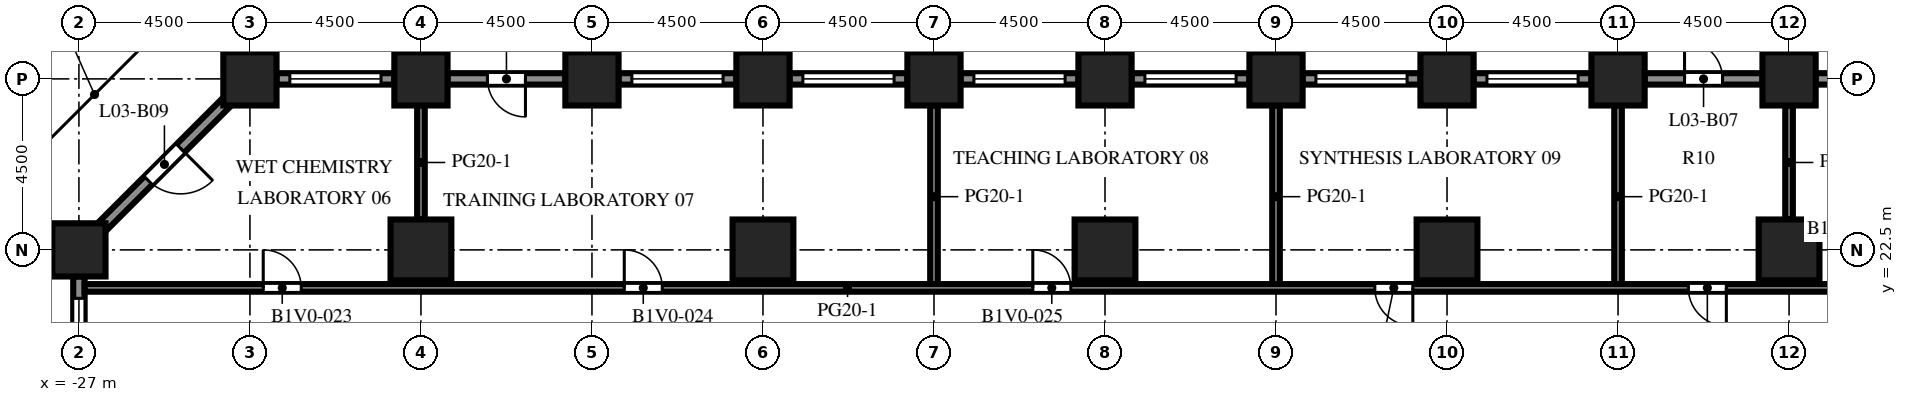
"""IFC4 building model, lengths in metres.
Left out: names, types, materials, properties, quantities, classifications, styles, units other than length and angle.
Written with IfcOpenShell. Run it as: python <this file> out.ifc"""

import sys

from ifc_helpers import new_model, si_unit, direction, frame, frame_2d, origin, origin_2d, place, context, subcontext, project, spatial, rectangle, extrude, element, fill, save


model = new_model("IFC4")
c1 = context("Model", 3, precision=1e-05, world=origin(), true_north=direction((0.0, 1.0)))
c2 = subcontext(c1, "Body", "Model", "MODEL_VIEW")
j1 = project(units=[si_unit("LENGTHUNIT", "METRE"), si_unit("PLANEANGLEUNIT", "RADIAN")], contexts=[c1])
p1 = place(None, origin())
s1 = spatial("IfcSite", under=j1, at=p1, CompositionType="ELEMENT")
p2 = place(p1, origin())
s2 = spatial("IfcBuilding", under=s1, at=p2, CompositionType="ELEMENT")
p3 = place(p2, frame((0.0, 0.0, 15.4)))
s3 = spatial("IfcBuildingStorey", under=s2, at=p3, CompositionType="ELEMENT", Elevation=15.4)
for number, where, z_axis, x_axis in (
    (1, (-27.0, 22.5, 0.0), (0.0, 0.0, 1.0), (1.0, 0.0, 0.0)),
    (2, (-22.5, 27.0, 0.0), (0.0, 0.0, 1.0), (1.0, 0.0, 0.0)),
    (3, (-18.0, 27.0, 0.0), (0.0, 0.0, 1.0), (1.0, 0.0, 0.0)),
    (4, (-13.5, 27.0, 0.0), (0.0, 0.0, 1.0), (1.0, 0.0, 0.0)),
    (5, (-9.0, 27.0, 0.0), (0.0, 0.0, 1.0), (1.0, 0.0, 0.0)),
    (6, (-4.5, 27.0, 0.0), (0.0, 0.0, 1.0), (1.0, 0.0, 0.0)),
    (7, (0.0, 27.0, 0.0), (0.0, 0.0, 1.0), (1.0, 0.0, 0.0)),
    (8, (4.5, 27.0, 0.0), (0.0, 0.0, 1.0), (1.0, 0.0, 0.0)),
    (9, (9.0, 27.0, 0.0), (0.0, 0.0, 1.0), (1.0, 0.0, 0.0)),
    (10, (13.5, 27.0, 0.0), (0.0, 0.0, 1.0), (1.0, 0.0, 0.0)),
    (11, (18.0, 27.0, 0.0), (0.0, 0.0, 1.0), (1.0, 0.0, 0.0)),
):
    element("IfcColumn", number, at=place(p3, frame(where, z_axis=z_axis, x_axis=x_axis)), inside=s3, PredefinedType="COLUMN", context=c2, shape_type="SweptSolid", body=[
        extrude(rectangle(XDim=1.4, YDim=1.4, at=origin_2d()), origin(), (0.0, 0.0, 1.0), 4.1),
    ])
for number, where, z_axis, x_axis in (
    (12, (-18.0, 22.5, 0.0), (0.0, 0.0, 1.0), (1.0, 0.0, 0.0)),
    (13, (-9.0, 22.5, 0.0), (0.0, 0.0, 1.0), (1.0, 0.0, 0.0)),
    (14, (0.0, 22.5, 0.0), (0.0, 0.0, 1.0), (1.0, 0.0, 0.0)),
    (15, (9.0, 22.5, 0.0), (0.0, 0.0, 1.0), (1.0, 0.0, 0.0)),
    (16, (18.0, 22.5, 0.0), (0.0, 0.0, 1.0), (1.0, 0.0, 0.0)),
):
    element("IfcColumn", number, at=place(p3, frame(where, z_axis=z_axis, x_axis=x_axis)), inside=s3, PredefinedType="COLUMN", context=c2, shape_type="SweptSolid", body=[
        extrude(rectangle(XDim=1.6, YDim=1.6, at=origin_2d()), origin(), (0.0, 0.0, 1.0), 4.1),
    ])
p4 = place(p3, frame((18.7, 27.0, 0.0), z_axis=(0.0, 0.0, 1.0), x_axis=(1.0, 0.0, 0.0)))
e17 = element("IfcWall", 17, at=p4, inside=s3, PredefinedType="SOLIDWALL", context=c2, shape_type="SweptSolid", body=[
    extrude(rectangle(XDim=3.1, YDim=0.3, at=frame_2d((1.55, 0.0))), origin(), (0.0, 0.0, 1.0), 2.75),
])
p5 = place(p4, frame((0.35, 0.0, 0.8)))
e18 = element("IfcOpeningElement", 18, at=p5, cuts=e17, PredefinedType="OPENING", context=c2, shape_type="SweptSolid", body=[
    extrude(rectangle(XDim=2.4, YDim=1.7, at=frame_2d((1.2, 0.85))), frame((0.0, 0.16, 0.0), z_axis=(0.0, -1.0, 0.0), x_axis=(1.0, 0.0, 0.0)), (0.0, 0.0, 1.0), 0.32),
])
p6 = place(p3, frame((14.2, 27.0, 0.0), z_axis=(0.0, 0.0, 1.0), x_axis=(1.0, 0.0, 0.0)))
e19 = element("IfcWall", 19, at=p6, inside=s3, PredefinedType="SOLIDWALL", context=c2, shape_type="SweptSolid", body=[
    extrude(rectangle(XDim=3.1, YDim=0.3, at=frame_2d((1.55, 0.0))), origin(), (0.0, 0.0, 1.0), 2.75),
])
p7 = place(p6, frame((1.05, 0.0, 0.0)))
e20 = element("IfcOpeningElement", 20, at=p7, cuts=e19, PredefinedType="OPENING", context=c2, shape_type="SweptSolid", body=[
    extrude(rectangle(XDim=1.0, YDim=2.2, at=frame_2d((0.5, 1.1))), frame((0.0, 0.16, 0.0), z_axis=(0.0, -1.0, 0.0), x_axis=(1.0, 0.0, 0.0)), (0.0, 0.0, 1.0), 0.32),
])
p8 = place(p3, frame((9.7, 27.0, 0.0), z_axis=(0.0, 0.0, 1.0), x_axis=(1.0, 0.0, 0.0)))
e21 = element("IfcWall", 21, at=p8, inside=s3, PredefinedType="SOLIDWALL", context=c2, shape_type="SweptSolid", body=[
    extrude(rectangle(XDim=3.1, YDim=0.3, at=frame_2d((1.55, 0.0))), origin(), (0.0, 0.0, 1.0), 2.75),
])
p9 = place(p8, frame((0.35, 0.0, 0.8)))
e22 = element("IfcOpeningElement", 22, at=p9, cuts=e21, PredefinedType="OPENING", context=c2, shape_type="SweptSolid", body=[
    extrude(rectangle(XDim=2.4, YDim=1.7, at=frame_2d((1.2, 0.85))), frame((0.0, 0.16, 0.0), z_axis=(0.0, -1.0, 0.0), x_axis=(1.0, 0.0, 0.0)), (0.0, 0.0, 1.0), 0.32),
])
p10 = place(p3, frame((5.2, 27.0, 0.0), z_axis=(0.0, 0.0, 1.0), x_axis=(1.0, 0.0, 0.0)))
e23 = element("IfcWall", 23, at=p10, inside=s3, PredefinedType="SOLIDWALL", context=c2, shape_type="SweptSolid", body=[
    extrude(rectangle(XDim=3.1, YDim=0.3, at=frame_2d((1.55, 0.0))), origin(), (0.0, 0.0, 1.0), 2.75),
])
p11 = place(p10, frame((0.35, 0.0, 0.8)))
e24 = element("IfcOpeningElement", 24, at=p11, cuts=e23, PredefinedType="OPENING", context=c2, shape_type="SweptSolid", body=[
    extrude(rectangle(XDim=2.4, YDim=1.7, at=frame_2d((1.2, 0.85))), frame((0.0, 0.16, 0.0), z_axis=(0.0, -1.0, 0.0), x_axis=(1.0, 0.0, 0.0)), (0.0, 0.0, 1.0), 0.32),
])
p12 = place(p3, frame((0.7, 27.0, 0.0), z_axis=(0.0, 0.0, 1.0), x_axis=(1.0, 0.0, 0.0)))
e25 = element("IfcWall", 25, at=p12, inside=s3, PredefinedType="SOLIDWALL", context=c2, shape_type="SweptSolid", body=[
    extrude(rectangle(XDim=3.1, YDim=0.3, at=frame_2d((1.55, 0.0))), origin(), (0.0, 0.0, 1.0), 2.75),
])
p13 = place(p12, frame((0.35, 0.0, 0.8)))
e26 = element("IfcOpeningElement", 26, at=p13, cuts=e25, PredefinedType="OPENING", context=c2, shape_type="SweptSolid", body=[
    extrude(rectangle(XDim=2.4, YDim=1.7, at=frame_2d((1.2, 0.85))), frame((0.0, 0.16, 0.0), z_axis=(0.0, -1.0, 0.0), x_axis=(1.0, 0.0, 0.0)), (0.0, 0.0, 1.0), 0.32),
])
p14 = place(p3, frame((-3.8, 27.0, 0.0), z_axis=(0.0, 0.0, 1.0), x_axis=(1.0, 0.0, 0.0)))
e27 = element("IfcWall", 27, at=p14, inside=s3, PredefinedType="SOLIDWALL", context=c2, shape_type="SweptSolid", body=[
    extrude(rectangle(XDim=3.1, YDim=0.3, at=frame_2d((1.55, 0.0))), origin(), (0.0, 0.0, 1.0), 2.75),
])
p15 = place(p14, frame((0.35, 0.0, 0.8)))
e28 = element("IfcOpeningElement", 28, at=p15, cuts=e27, PredefinedType="OPENING", context=c2, shape_type="SweptSolid", body=[
    extrude(rectangle(XDim=2.4, YDim=1.7, at=frame_2d((1.2, 0.85))), frame((0.0, 0.16, 0.0), z_axis=(0.0, -1.0, 0.0), x_axis=(1.0, 0.0, 0.0)), (0.0, 0.0, 1.0), 0.32),
])
p16 = place(p3, frame((-8.3, 27.0, 0.0), z_axis=(0.0, 0.0, 1.0), x_axis=(1.0, 0.0, 0.0)))
e29 = element("IfcWall", 29, at=p16, inside=s3, PredefinedType="SOLIDWALL", context=c2, shape_type="SweptSolid", body=[
    extrude(rectangle(XDim=3.1, YDim=0.3, at=frame_2d((1.55, 0.0))), origin(), (0.0, 0.0, 1.0), 2.75),
])
p17 = place(p16, frame((0.35, 0.0, 0.8)))
e30 = element("IfcOpeningElement", 30, at=p17, cuts=e29, PredefinedType="OPENING", context=c2, shape_type="SweptSolid", body=[
    extrude(rectangle(XDim=2.4, YDim=1.7, at=frame_2d((1.2, 0.85))), frame((0.0, 0.16, 0.0), z_axis=(0.0, -1.0, 0.0), x_axis=(1.0, 0.0, 0.0)), (0.0, 0.0, 1.0), 0.32),
])
p18 = place(p3, frame((-12.8, 27.0, 0.0), z_axis=(0.0, 0.0, 1.0), x_axis=(1.0, 0.0, 0.0)))
e31 = element("IfcWall", 31, at=p18, inside=s3, PredefinedType="SOLIDWALL", context=c2, shape_type="SweptSolid", body=[
    extrude(rectangle(XDim=3.1, YDim=0.3, at=frame_2d((1.55, 0.0))), origin(), (0.0, 0.0, 1.0), 2.75),
])
p19 = place(p18, frame((0.35, 0.0, 0.8)))
e32 = element("IfcOpeningElement", 32, at=p19, cuts=e31, PredefinedType="OPENING", context=c2, shape_type="SweptSolid", body=[
    extrude(rectangle(XDim=2.4, YDim=1.7, at=frame_2d((1.2, 0.85))), frame((0.0, 0.16, 0.0), z_axis=(0.0, -1.0, 0.0), x_axis=(1.0, 0.0, 0.0)), (0.0, 0.0, 1.0), 0.32),
])
p20 = place(p3, frame((-17.3, 27.0, 0.0), z_axis=(0.0, 0.0, 1.0), x_axis=(1.0, 0.0, 0.0)))
e33 = element("IfcWall", 33, at=p20, inside=s3, PredefinedType="SOLIDWALL", context=c2, shape_type="SweptSolid", body=[
    extrude(rectangle(XDim=3.1, YDim=0.3, at=frame_2d((1.55, 0.0))), origin(), (0.0, 0.0, 1.0), 2.75),
])
p21 = place(p20, frame((1.05, 0.0, 0.0)))
e34 = element("IfcOpeningElement", 34, at=p21, cuts=e33, PredefinedType="OPENING", context=c2, shape_type="SweptSolid", body=[
    extrude(rectangle(XDim=1.0, YDim=2.2, at=frame_2d((0.5, 1.1))), frame((0.0, 0.16, 0.0), z_axis=(0.0, -1.0, 0.0), x_axis=(1.0, 0.0, 0.0)), (0.0, 0.0, 1.0), 0.32),
])
p22 = place(p3, frame((-21.8, 27.0, 0.0), z_axis=(0.0, 0.0, 1.0), x_axis=(1.0, 0.0, 0.0)))
e35 = element("IfcWall", 35, at=p22, inside=s3, PredefinedType="SOLIDWALL", context=c2, shape_type="SweptSolid", body=[
    extrude(rectangle(XDim=3.1, YDim=0.3, at=frame_2d((1.55, 0.0))), origin(), (0.0, 0.0, 1.0), 2.75),
])
p23 = place(p22, frame((0.35, 0.0, 0.8)))
e36 = element("IfcOpeningElement", 36, at=p23, cuts=e35, PredefinedType="OPENING", context=c2, shape_type="SweptSolid", body=[
    extrude(rectangle(XDim=2.4, YDim=1.7, at=frame_2d((1.2, 0.85))), frame((0.0, 0.16, 0.0), z_axis=(0.0, -1.0, 0.0), x_axis=(1.0, 0.0, 0.0)), (0.0, 0.0, 1.0), 0.32),
])
p24 = place(p3, frame((-26.406, 23.094, 0.0), z_axis=(0.0, 0.0, 1.0), x_axis=(0.707106781187, 0.707106781187, 0.0)))
e37 = element("IfcWall", 37, at=p24, inside=s3, PredefinedType="SOLIDWALL", context=c2, shape_type="SweptSolid", body=[
    extrude(rectangle(XDim=4.684, YDim=0.3, at=frame_2d((2.342, 0.0))), origin(), (0.0, 0.0, 1.0), 2.75),
])
p25 = place(p24, frame((1.742, 0.0, 0.0)))
e38 = element("IfcOpeningElement", 38, at=p25, cuts=e37, PredefinedType="OPENING", context=c2, shape_type="SweptSolid", body=[
    extrude(rectangle(XDim=1.2, YDim=2.2, at=frame_2d((0.6, 1.1))), frame((0.0, 0.16, 0.0), z_axis=(0.0, -1.0, 0.0), x_axis=(1.0, 0.0, 0.0)), (0.0, 0.0, 1.0), 0.32),
])
p26 = place(p3, frame((-27.0, 18.7, 0.0), z_axis=(0.0, 0.0, 1.0), x_axis=(0.0, 1.0, 0.0)))
e39 = element("IfcWall", 39, at=p26, inside=s3, PredefinedType="SOLIDWALL", context=c2, shape_type="SweptSolid", body=[
    extrude(rectangle(XDim=3.1, YDim=0.3, at=frame_2d((1.55, 0.0))), origin(), (0.0, 0.0, 1.0), 2.75),
])
p27 = place(p26, frame((0.125, 0.0, 0.8)))
e40 = element("IfcOpeningElement", 40, at=p27, cuts=e39, PredefinedType="OPENING", context=c2, shape_type="SweptSolid", body=[
    extrude(rectangle(XDim=2.4, YDim=1.7, at=frame_2d((1.2, 0.85))), frame((0.0, 0.16, 0.0), z_axis=(0.0, -1.0, 0.0), x_axis=(1.0, 0.0, 0.0)), (0.0, 0.0, 1.0), 0.32),
])
p28 = place(p3, frame((-18.0, 23.3, 0.0), z_axis=(0.0, 0.0, 1.0), x_axis=(0.0, 1.0, 0.0)))
e41 = element("IfcWall", 41, at=p28, inside=s3, PredefinedType="PARTITIONING", context=c2, shape_type="SweptSolid", body=[
    extrude(rectangle(XDim=3.0, YDim=0.2, at=frame_2d((1.5, 0.0))), origin(), (0.0, 0.0, 1.0), 3.65),
])
for number, where, z_axis, x_axis in (
    (42, (-4.5, 21.5, 0.0), (0.0, 0.0, 1.0), (0.0, 1.0, 0.0)),
    (43, (4.5, 21.5, 0.0), (0.0, 0.0, 1.0), (0.0, 1.0, 0.0)),
    (44, (13.5, 21.5, 0.0), (0.0, 0.0, 1.0), (0.0, 1.0, 0.0)),
):
    element("IfcWall", number, at=place(p3, frame(where, z_axis=z_axis, x_axis=x_axis)), inside=s3, PredefinedType="PARTITIONING", context=c2, shape_type="SweptSolid", body=[
        extrude(rectangle(XDim=4.8, YDim=0.2, at=frame_2d((2.4, 0.0))), origin(), (0.0, 0.0, 1.0), 3.65),
    ])
p29 = place(p3, frame((18.0, 23.3, 0.0), z_axis=(0.0, 0.0, 1.0), x_axis=(0.0, 1.0, 0.0)))
e45 = element("IfcWall", 45, at=p29, inside=s3, PredefinedType="PARTITIONING", context=c2, shape_type="SweptSolid", body=[
    extrude(rectangle(XDim=3.0, YDim=0.2, at=frame_2d((1.5, 0.0))), origin(), (0.0, 0.0, 1.0), 3.65),
])
p30 = place(p3, frame((-26.85, 21.5, 0.0), z_axis=(0.0, 0.0, 1.0), x_axis=(1.0, 0.0, 0.0)))
e46 = element("IfcWall", 46, at=p30, inside=s3, PredefinedType="PARTITIONING", context=c2, shape_type="SweptSolid", body=[
    extrude(rectangle(XDim=53.7, YDim=0.2, at=frame_2d((26.85, 0.0))), origin(), (0.0, 0.0, 1.0), 3.65),
])
p31 = place(p30, frame((4.7, 0.0, 0.0)))
e47 = element("IfcOpeningElement", 47, at=p31, cuts=e46, PredefinedType="OPENING", context=c2, shape_type="SweptSolid", body=[
    extrude(rectangle(XDim=1.0, YDim=2.1, at=frame_2d((0.5, 1.05))), frame((0.0, 0.11, 0.0), z_axis=(0.0, -1.0, 0.0), x_axis=(1.0, 0.0, 0.0)), (0.0, 0.0, 1.0), 0.22),
])
p32 = place(p30, frame((14.2, 0.0, 0.0)))
e48 = element("IfcOpeningElement", 48, at=p32, cuts=e46, PredefinedType="OPENING", context=c2, shape_type="SweptSolid", body=[
    extrude(rectangle(XDim=1.0, YDim=2.1, at=frame_2d((0.5, 1.05))), frame((0.0, 0.11, 0.0), z_axis=(0.0, -1.0, 0.0), x_axis=(1.0, 0.0, 0.0)), (0.0, 0.0, 1.0), 0.22),
])
p33 = place(p30, frame((24.95, 0.0, 0.0)))
e49 = element("IfcOpeningElement", 49, at=p33, cuts=e46, PredefinedType="OPENING", context=c2, shape_type="SweptSolid", body=[
    extrude(rectangle(XDim=1.0, YDim=2.1, at=frame_2d((0.5, 1.05))), frame((0.0, 0.11, 0.0), z_axis=(0.0, -1.0, 0.0), x_axis=(1.0, 0.0, 0.0)), (0.0, 0.0, 1.0), 0.22),
])
p34 = place(p30, frame((33.95, 0.0, 0.0)))
e50 = element("IfcOpeningElement", 50, at=p34, cuts=e46, PredefinedType="OPENING", context=c2, shape_type="SweptSolid", body=[
    extrude(rectangle(XDim=1.0, YDim=2.1, at=frame_2d((0.5, 1.05))), frame((0.0, 0.11, 0.0), z_axis=(0.0, -1.0, 0.0), x_axis=(1.0, 0.0, 0.0)), (0.0, 0.0, 1.0), 0.22),
])
p35 = place(p30, frame((42.2, 0.0, 0.0)))
e51 = element("IfcOpeningElement", 51, at=p35, cuts=e46, PredefinedType="OPENING", context=c2, shape_type="SweptSolid", body=[
    extrude(rectangle(XDim=1.0, YDim=2.1, at=frame_2d((0.5, 1.05))), frame((0.0, 0.11, 0.0), z_axis=(0.0, -1.0, 0.0), x_axis=(1.0, 0.0, 0.0)), (0.0, 0.0, 1.0), 0.22),
])
p36 = place(p30, frame((47.45, 0.0, 0.0)))
e52 = element("IfcOpeningElement", 52, at=p36, cuts=e46, PredefinedType="OPENING", context=c2, shape_type="SweptSolid", body=[
    extrude(rectangle(XDim=1.0, YDim=2.1, at=frame_2d((0.5, 1.05))), frame((0.0, 0.11, 0.0), z_axis=(0.0, -1.0, 0.0), x_axis=(1.0, 0.0, 0.0)), (0.0, 0.0, 1.0), 0.22),
])
p37 = place(p7, origin())
e53 = element("IfcDoor", 53, at=p37, inside=s3, OperationType="SINGLE_SWING_LEFT", PredefinedType="DOOR", context=c2, shape_type="SweptSolid", body=[
    extrude(rectangle(XDim=1.0, YDim=2.2, at=frame_2d((0.5, 1.1))), frame((0.0, 0.025, 0.0), z_axis=(0.0, -1.0, 0.0), x_axis=(1.0, 0.0, 0.0)), (0.0, 0.0, 1.0), 0.05),
])
fill(e20, e53)
p38 = place(p9, origin())
e54 = element("IfcWindow", 54, at=p38, inside=s3, PartitioningType="SINGLE_PANEL", PredefinedType="WINDOW", context=c2, shape_type="SweptSolid", body=[
    extrude(rectangle(XDim=2.4, YDim=1.7, at=frame_2d((1.2, 0.85))), frame((0.0, 0.03, 0.0), z_axis=(0.0, -1.0, 0.0), x_axis=(1.0, 0.0, 0.0)), (0.0, 0.0, 1.0), 0.06),
])
fill(e22, e54)
p39 = place(p11, origin())
e55 = element("IfcWindow", 55, at=p39, inside=s3, PartitioningType="SINGLE_PANEL", PredefinedType="WINDOW", context=c2, shape_type="SweptSolid", body=[
    extrude(rectangle(XDim=2.4, YDim=1.7, at=frame_2d((1.2, 0.85))), frame((0.0, 0.03, 0.0), z_axis=(0.0, -1.0, 0.0), x_axis=(1.0, 0.0, 0.0)), (0.0, 0.0, 1.0), 0.06),
])
fill(e24, e55)
p40 = place(p13, origin())
e56 = element("IfcWindow", 56, at=p40, inside=s3, PartitioningType="SINGLE_PANEL", PredefinedType="WINDOW", context=c2, shape_type="SweptSolid", body=[
    extrude(rectangle(XDim=2.4, YDim=1.7, at=frame_2d((1.2, 0.85))), frame((0.0, 0.03, 0.0), z_axis=(0.0, -1.0, 0.0), x_axis=(1.0, 0.0, 0.0)), (0.0, 0.0, 1.0), 0.06),
])
fill(e26, e56)
p41 = place(p15, origin())
e57 = element("IfcWindow", 57, at=p41, inside=s3, PartitioningType="SINGLE_PANEL", PredefinedType="WINDOW", context=c2, shape_type="SweptSolid", body=[
    extrude(rectangle(XDim=2.4, YDim=1.7, at=frame_2d((1.2, 0.85))), frame((0.0, 0.03, 0.0), z_axis=(0.0, -1.0, 0.0), x_axis=(1.0, 0.0, 0.0)), (0.0, 0.0, 1.0), 0.06),
])
fill(e28, e57)
p42 = place(p17, origin())
e58 = element("IfcWindow", 58, at=p42, inside=s3, PartitioningType="SINGLE_PANEL", PredefinedType="WINDOW", context=c2, shape_type="SweptSolid", body=[
    extrude(rectangle(XDim=2.4, YDim=1.7, at=frame_2d((1.2, 0.85))), frame((0.0, 0.03, 0.0), z_axis=(0.0, -1.0, 0.0), x_axis=(1.0, 0.0, 0.0)), (0.0, 0.0, 1.0), 0.06),
])
fill(e30, e58)
p43 = place(p19, origin())
e59 = element("IfcWindow", 59, at=p43, inside=s3, PartitioningType="SINGLE_PANEL", PredefinedType="WINDOW", context=c2, shape_type="SweptSolid", body=[
    extrude(rectangle(XDim=2.4, YDim=1.7, at=frame_2d((1.2, 0.85))), frame((0.0, 0.03, 0.0), z_axis=(0.0, -1.0, 0.0), x_axis=(1.0, 0.0, 0.0)), (0.0, 0.0, 1.0), 0.06),
])
fill(e32, e59)
p44 = place(p21, origin())
e60 = element("IfcDoor", 60, at=p44, inside=s3, OperationType="SINGLE_SWING_RIGHT", PredefinedType="DOOR", context=c2, shape_type="SweptSolid", body=[
    extrude(rectangle(XDim=1.0, YDim=2.2, at=frame_2d((0.5, 1.1))), frame((0.0, 0.025, 0.0), z_axis=(0.0, -1.0, 0.0), x_axis=(1.0, 0.0, 0.0)), (0.0, 0.0, 1.0), 0.05),
])
fill(e34, e60)
p45 = place(p23, origin())
e61 = element("IfcWindow", 61, at=p45, inside=s3, PartitioningType="SINGLE_PANEL", PredefinedType="WINDOW", context=c2, shape_type="SweptSolid", body=[
    extrude(rectangle(XDim=2.4, YDim=1.7, at=frame_2d((1.2, 0.85))), frame((0.0, 0.03, 0.0), z_axis=(0.0, -1.0, 0.0), x_axis=(1.0, 0.0, 0.0)), (0.0, 0.0, 1.0), 0.06),
])
fill(e36, e61)
p46 = place(p25, origin())
e62 = element("IfcDoor", 62, at=p46, inside=s3, OperationType="SINGLE_SWING_RIGHT", PredefinedType="DOOR", context=c2, shape_type="SweptSolid", body=[
    extrude(rectangle(XDim=1.2, YDim=2.2, at=frame_2d((0.6, 1.1))), frame((0.0, 0.025, 0.0), z_axis=(0.0, -1.0, 0.0), x_axis=(1.0, 0.0, 0.0)), (0.0, 0.0, 1.0), 0.05),
])
fill(e38, e62)
p47 = place(p27, origin())
e63 = element("IfcWindow", 63, at=p47, inside=s3, PartitioningType="SINGLE_PANEL", PredefinedType="WINDOW", context=c2, shape_type="SweptSolid", body=[
    extrude(rectangle(XDim=2.4, YDim=1.7, at=frame_2d((1.2, 0.85))), frame((0.0, 0.03, 0.0), z_axis=(0.0, -1.0, 0.0), x_axis=(1.0, 0.0, 0.0)), (0.0, 0.0, 1.0), 0.06),
])
fill(e40, e63)
p48 = place(p31, origin())
e64 = element("IfcDoor", 64, at=p48, inside=s3, OperationType="SINGLE_SWING_LEFT", PredefinedType="DOOR", context=c2, shape_type="SweptSolid", body=[
    extrude(rectangle(XDim=1.0, YDim=2.1, at=frame_2d((0.5, 1.05))), frame((0.0, 0.025, 0.0), z_axis=(0.0, -1.0, 0.0), x_axis=(1.0, 0.0, 0.0)), (0.0, 0.0, 1.0), 0.05),
])
fill(e47, e64)
p49 = place(p32, origin())
e65 = element("IfcDoor", 65, at=p49, inside=s3, OperationType="SINGLE_SWING_LEFT", PredefinedType="DOOR", context=c2, shape_type="SweptSolid", body=[
    extrude(rectangle(XDim=1.0, YDim=2.1, at=frame_2d((0.5, 1.05))), frame((0.0, 0.025, 0.0), z_axis=(0.0, -1.0, 0.0), x_axis=(1.0, 0.0, 0.0)), (0.0, 0.0, 1.0), 0.05),
])
fill(e48, e65)
p50 = place(p33, origin())
e66 = element("IfcDoor", 66, at=p50, inside=s3, OperationType="SINGLE_SWING_LEFT", PredefinedType="DOOR", context=c2, shape_type="SweptSolid", body=[
    extrude(rectangle(XDim=1.0, YDim=2.1, at=frame_2d((0.5, 1.05))), frame((0.0, 0.025, 0.0), z_axis=(0.0, -1.0, 0.0), x_axis=(1.0, 0.0, 0.0)), (0.0, 0.0, 1.0), 0.05),
])
fill(e49, e66)
p51 = place(p34, origin())
e67 = element("IfcDoor", 67, at=p51, inside=s3, OperationType="SINGLE_SWING_RIGHT", PredefinedType="DOOR", context=c2, shape_type="SweptSolid", body=[
    extrude(rectangle(XDim=1.0, YDim=2.1, at=frame_2d((0.5, 1.05))), frame((0.0, 0.025, 0.0), z_axis=(0.0, -1.0, 0.0), x_axis=(1.0, 0.0, 0.0)), (0.0, 0.0, 1.0), 0.05),
])
fill(e50, e67)
p52 = place(p35, origin())
e68 = element("IfcDoor", 68, at=p52, inside=s3, OperationType="SINGLE_SWING_RIGHT", PredefinedType="DOOR", context=c2, shape_type="SweptSolid", body=[
    extrude(rectangle(XDim=1.0, YDim=2.1, at=frame_2d((0.5, 1.05))), frame((0.0, 0.025, 0.0), z_axis=(0.0, -1.0, 0.0), x_axis=(1.0, 0.0, 0.0)), (0.0, 0.0, 1.0), 0.05),
])
fill(e51, e68)
save(model, sys.argv[1])
